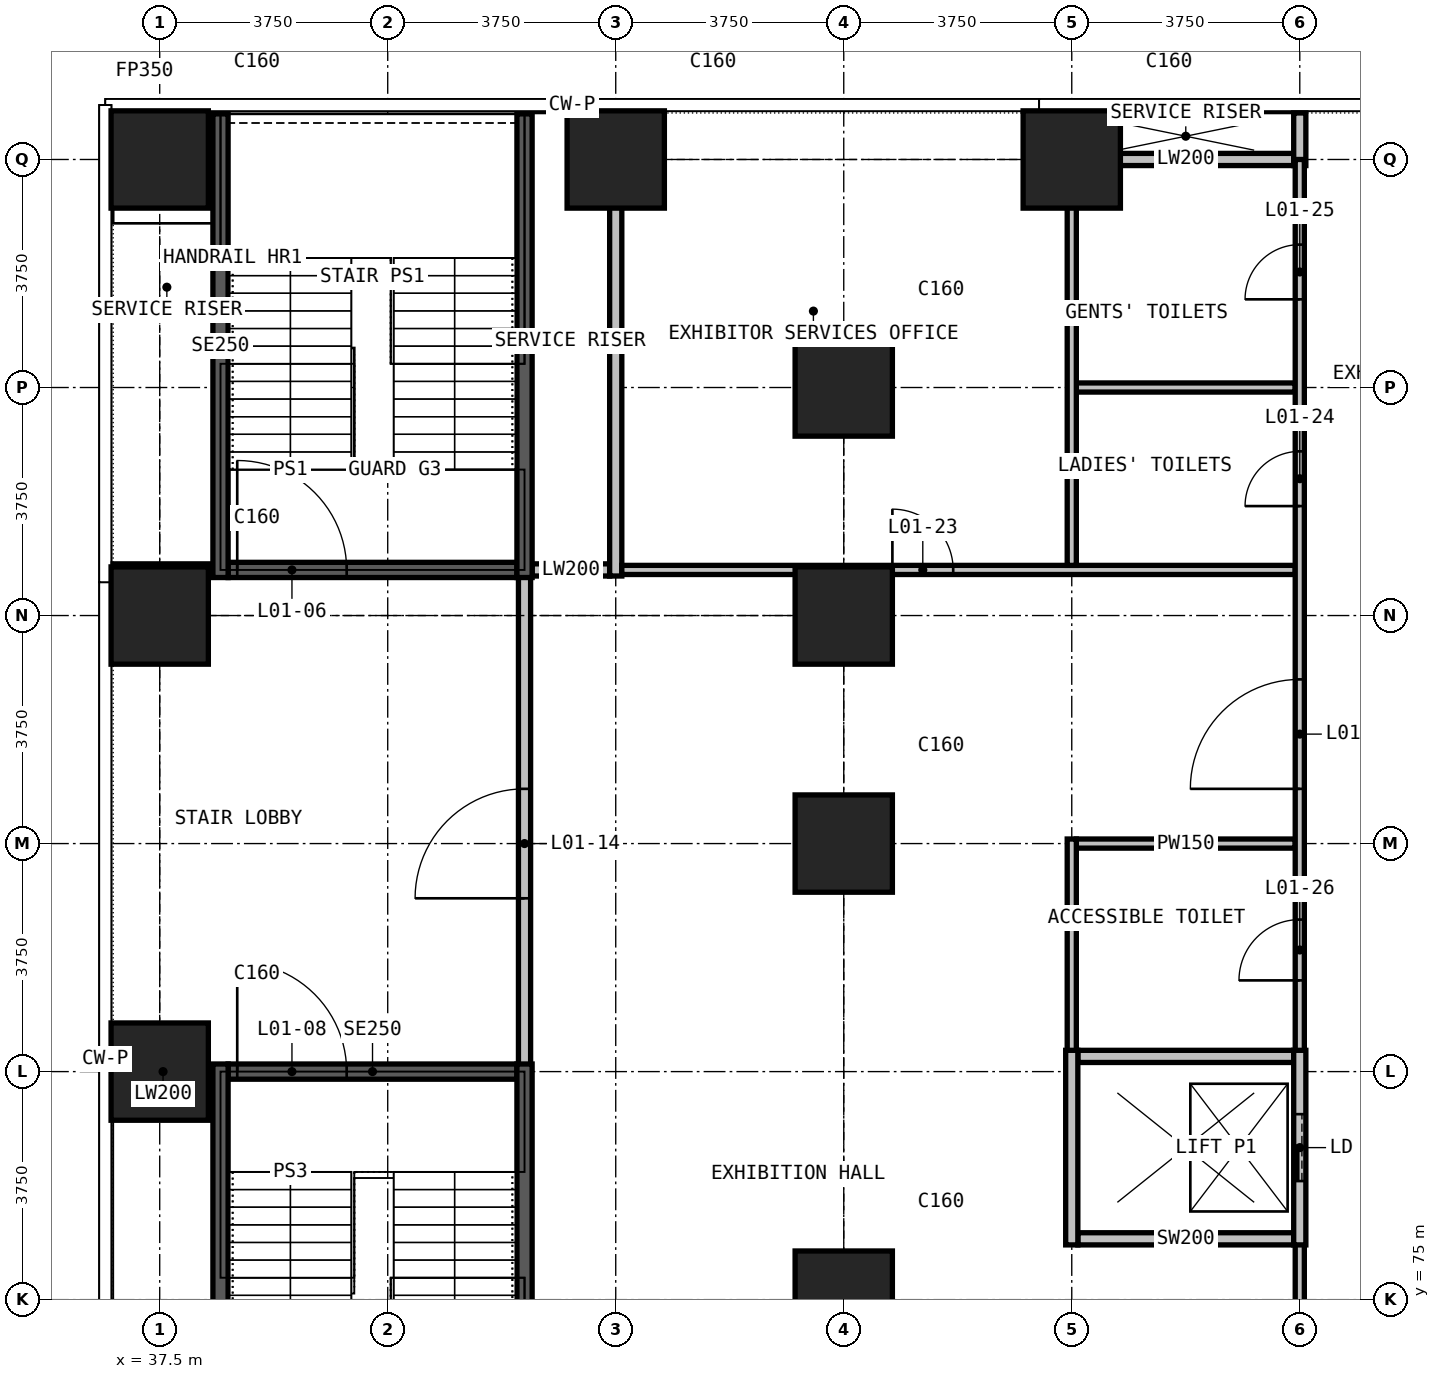
"""IFC4 building model, lengths in metres.
Left out: names, types, materials, properties, quantities, classifications, styles, units other than length and angle.
Written with IfcOpenShell. Run it as: python <this file> out.ifc"""

import sys

from ifc_helpers import new_model, si_unit, direction, frame, frame_2d, origin, origin_2d, place, context, subcontext, project, spatial, rectangle, extrude, element, fill, save


model = new_model("IFC4")
c1 = context("Model", 3, precision=1e-05, world=origin(), true_north=direction((0.0, 1.0)))
c2 = subcontext(c1, "Body", "Model", "MODEL_VIEW")
j1 = project(units=[si_unit("LENGTHUNIT", "METRE"), si_unit("PLANEANGLEUNIT", "RADIAN")], contexts=[c1])
p1 = place(None, origin())
s1 = spatial("IfcSite", under=j1, at=p1, CompositionType="ELEMENT")
p2 = place(p1, origin())
s2 = spatial("IfcBuilding", under=s1, at=p2, CompositionType="ELEMENT")
p3 = place(p2, frame((0.0, 0.0, 7.5)))
s3 = spatial("IfcBuildingStorey", under=s2, at=p3, CompositionType="ELEMENT", Elevation=7.5)
for number, where, z_axis, x_axis in (
    (1, (37.5, 78.75, 0.0), (0.0, 0.0, 1.0), (1.0, 0.0, 0.0)),
    (2, (37.5, 86.25, 0.0), (0.0, 0.0, 1.0), (1.0, 0.0, 0.0)),
    (3, (37.5, 93.75, 0.0), (0.0, 0.0, 1.0), (1.0, 0.0, 0.0)),
    (4, (45.0, 93.75, 0.0), (0.0, 0.0, 1.0), (1.0, 0.0, 0.0)),
    (5, (48.75, 75.0, 0.0), (0.0, 0.0, 1.0), (1.0, 0.0, 0.0)),
    (6, (48.75, 82.5, 0.0), (0.0, 0.0, 1.0), (1.0, 0.0, 0.0)),
    (7, (48.75, 86.25, 0.0), (0.0, 0.0, 1.0), (1.0, 0.0, 0.0)),
    (8, (48.75, 90.0, 0.0), (0.0, 0.0, 1.0), (1.0, 0.0, 0.0)),
    (9, (52.5, 93.75, 0.0), (0.0, 0.0, 1.0), (1.0, 0.0, 0.0)),
):
    element("IfcColumn", number, at=place(p3, frame(where, z_axis=z_axis, x_axis=x_axis)), inside=s3, PredefinedType="COLUMN", context=c2, shape_type="SweptSolid", body=[
        extrude(rectangle(XDim=1.6, YDim=1.6, at=origin_2d()), origin(), (0.0, 0.0, 1.0), 9.0),
    ])
for number, where, z_axis, x_axis in (
    (10, (36.735, 78.75, 0.0), (0.0, 0.0, 1.0), (1.0, 0.0, 0.0)),
    (11, (36.735, 87.0, 0.0), (0.0, 0.0, 1.0), (1.0, 0.0, 0.0)),
):
    element("IfcWall", number, at=place(p3, frame(where, z_axis=z_axis, x_axis=x_axis)), inside=s3, PredefinedType="PARTITIONING", context=c2, shape_type="SweptSolid", body=[
        extrude(rectangle(XDim=1.64, YDim=0.2, at=frame_2d((0.82, 0.0))), origin(), (0.0, 0.0, 1.0), 8.65),
    ])
p4 = place(p3, frame((43.625, 87.0, 0.0), z_axis=(0.0, 0.0, 1.0), x_axis=(1.0, 0.0, 0.0)))
e12 = element("IfcWall", 12, at=p4, inside=s3, PredefinedType="PARTITIONING", context=c2, shape_type="SweptSolid", body=[
    extrude(rectangle(XDim=1.275, YDim=0.2, at=frame_2d((0.637, 0.0))), origin(), (0.0, 0.0, 1.0), 8.65),
])
p5 = place(p3, frame((52.6, 93.75, 0.0), z_axis=(0.0, 0.0, 1.0), x_axis=(1.0, 0.0, 0.0)))
e13 = element("IfcWall", 13, at=p5, inside=s3, PredefinedType="PARTITIONING", context=c2, shape_type="SweptSolid", body=[
    extrude(rectangle(XDim=3.55, YDim=0.2, at=frame_2d((1.775, 0.0))), origin(), (0.0, 0.0, 1.0), 8.65),
])
p6 = place(p3, frame((43.5, 78.625, 0.0), z_axis=(0.0, 0.0, 1.0), x_axis=(0.0, 1.0, 0.0)))
e14 = element("IfcWall", 14, at=p6, inside=s3, PredefinedType="PARTITIONING", context=c2, shape_type="SweptSolid", body=[
    extrude(rectangle(XDim=8.5, YDim=0.2, at=frame_2d((4.25, 0.0))), origin(), (0.0, 0.0, 1.0), 8.65),
])
p7 = place(p6, frame((2.975, 0.0, 0.0)))
e15 = element("IfcOpeningElement", 15, at=p7, cuts=e14, PredefinedType="OPENING", context=c2, shape_type="SweptSolid", body=[
    extrude(rectangle(XDim=1.8, YDim=2.2, at=frame_2d((0.9, 1.1))), frame((0.0, 0.11, 0.0), z_axis=(0.0, -1.0, 0.0), x_axis=(1.0, 0.0, 0.0)), (0.0, 0.0, 1.0), 0.22),
])
p8 = place(p3, frame((45.0, 86.9, 0.0), z_axis=(0.0, 0.0, 1.0), x_axis=(0.0, 1.0, 0.0)))
e16 = element("IfcWall", 16, at=p8, inside=s3, PredefinedType="PARTITIONING", context=c2, shape_type="SweptSolid", body=[
    extrude(rectangle(XDim=7.615, YDim=0.2, at=frame_2d((3.808, 0.0))), origin(), (0.0, 0.0, 1.0), 8.65),
])
for number, where, z_axis, x_axis in (
    (17, (52.5, 93.65, 0.0), (0.0, 0.0, 1.0), (0.0, 1.0, 0.0)),
    (18, (56.25, 93.65, 0.0), (0.0, 0.0, 1.0), (0.0, 1.0, 0.0)),
):
    element("IfcWall", number, at=place(p3, frame(where, z_axis=z_axis, x_axis=x_axis)), inside=s3, PredefinedType="PARTITIONING", context=c2, shape_type="SweptSolid", body=[
        extrude(rectangle(XDim=0.865, YDim=0.2, at=frame_2d((0.433, 0.0))), origin(), (0.0, 0.0, 1.0), 8.65),
    ])
p9 = place(p3, frame((52.575, 82.5, 0.0), z_axis=(0.0, 0.0, 1.0), x_axis=(1.0, 0.0, 0.0)))
e19 = element("IfcWall", 19, at=p9, inside=s3, PredefinedType="PARTITIONING", context=c2, shape_type="SweptSolid", body=[
    extrude(rectangle(XDim=3.6, YDim=0.15, at=frame_2d((1.8, 0.0))), origin(), (0.0, 0.0, 1.0), 8.65),
])
p10 = place(p3, frame((45.1, 87.0, 0.0), z_axis=(0.0, 0.0, 1.0), x_axis=(1.0, 0.0, 0.0)))
e20 = element("IfcWall", 20, at=p10, inside=s3, PredefinedType="PARTITIONING", context=c2, shape_type="SweptSolid", body=[
    extrude(rectangle(XDim=11.075, YDim=0.15, at=frame_2d((5.538, 0.0))), origin(), (0.0, 0.0, 1.0), 8.65),
])
p11 = place(p10, frame((4.45, 0.0, 0.0)))
e21 = element("IfcOpeningElement", 21, at=p11, cuts=e20, PredefinedType="OPENING", context=c2, shape_type="SweptSolid", body=[
    extrude(rectangle(XDim=1.0, YDim=2.2, at=frame_2d((0.5, 1.1))), frame((0.0, 0.085, 0.0), z_axis=(0.0, -1.0, 0.0), x_axis=(1.0, 0.0, 0.0)), (0.0, 0.0, 1.0), 0.17),
])
p12 = place(p3, frame((52.575, 90.0, 0.0), z_axis=(0.0, 0.0, 1.0), x_axis=(1.0, 0.0, 0.0)))
e22 = element("IfcWall", 22, at=p12, inside=s3, PredefinedType="PARTITIONING", context=c2, shape_type="SweptSolid", body=[
    extrude(rectangle(XDim=3.6, YDim=0.15, at=frame_2d((1.8, 0.0))), origin(), (0.0, 0.0, 1.0), 8.65),
])
p13 = place(p3, frame((52.5, 78.9, 0.0), z_axis=(0.0, 0.0, 1.0), x_axis=(0.0, 1.0, 0.0)))
e23 = element("IfcWall", 23, at=p13, inside=s3, PredefinedType="PARTITIONING", context=c2, shape_type="SweptSolid", body=[
    extrude(rectangle(XDim=3.675, YDim=0.15, at=frame_2d((1.837, 0.0))), origin(), (0.0, 0.0, 1.0), 8.65),
])
p14 = place(p3, frame((52.5, 87.075, 0.0), z_axis=(0.0, 0.0, 1.0), x_axis=(0.0, 1.0, 0.0)))
e24 = element("IfcWall", 24, at=p14, inside=s3, PredefinedType="PARTITIONING", context=c2, shape_type="SweptSolid", body=[
    extrude(rectangle(XDim=6.675, YDim=0.15, at=frame_2d((3.337, 0.0))), origin(), (0.0, 0.0, 1.0), 8.65),
])
p15 = place(p3, frame((56.25, 71.25, 0.0), z_axis=(0.0, 0.0, 1.0), x_axis=(0.0, 1.0, 0.0)))
e25 = element("IfcWall", 25, at=p15, inside=s3, PredefinedType="PARTITIONING", context=c2, shape_type="SweptSolid", body=[
    extrude(rectangle(XDim=4.85, YDim=0.15, at=frame_2d((2.425, 0.0))), origin(), (0.0, 0.0, 1.0), 8.65),
])
p16 = place(p15, frame((0.85, 0.0, 0.0)))
e26 = element("IfcOpeningElement", 26, at=p16, cuts=e25, PredefinedType="OPENING", context=c2, shape_type="SweptSolid", body=[
    extrude(rectangle(XDim=1.8, YDim=2.2, at=frame_2d((0.9, 1.1))), frame((0.0, 0.085, 0.0), z_axis=(0.0, -1.0, 0.0), x_axis=(1.0, 0.0, 0.0)), (0.0, 0.0, 1.0), 0.17),
])
p17 = place(p3, frame((56.25, 78.9, 0.0), z_axis=(0.0, 0.0, 1.0), x_axis=(0.0, 1.0, 0.0)))
e27 = element("IfcWall", 27, at=p17, inside=s3, PredefinedType="PARTITIONING", context=c2, shape_type="SweptSolid", body=[
    extrude(rectangle(XDim=14.85, YDim=0.15, at=frame_2d((7.425, 0.0))), origin(), (0.0, 0.0, 1.0), 8.65),
])
p18 = place(p17, frame((4.5, 0.0, 0.0)))
e28 = element("IfcOpeningElement", 28, at=p18, cuts=e27, PredefinedType="OPENING", context=c2, shape_type="SweptSolid", body=[
    extrude(rectangle(XDim=1.8, YDim=2.2, at=frame_2d((0.9, 1.1))), frame((0.0, 0.085, 0.0), z_axis=(0.0, -1.0, 0.0), x_axis=(1.0, 0.0, 0.0)), (0.0, 0.0, 1.0), 0.17),
])
p19 = place(p17, frame((9.15, 0.0, 0.0)))
e29 = element("IfcOpeningElement", 29, at=p19, cuts=e27, PredefinedType="OPENING", context=c2, shape_type="SweptSolid", body=[
    extrude(rectangle(XDim=0.9, YDim=2.2, at=frame_2d((0.45, 1.1))), frame((0.0, 0.085, 0.0), z_axis=(0.0, -1.0, 0.0), x_axis=(1.0, 0.0, 0.0)), (0.0, 0.0, 1.0), 0.17),
])
p20 = place(p17, frame((12.55, 0.0, 0.0)))
e30 = element("IfcOpeningElement", 30, at=p20, cuts=e27, PredefinedType="OPENING", context=c2, shape_type="SweptSolid", body=[
    extrude(rectangle(XDim=0.9, YDim=2.2, at=frame_2d((0.45, 1.1))), frame((0.0, 0.085, 0.0), z_axis=(0.0, -1.0, 0.0), x_axis=(1.0, 0.0, 0.0)), (0.0, 0.0, 1.0), 0.17),
])
p21 = place(p17, frame((1.35, 0.0, 0.0)))
e31 = element("IfcOpeningElement", 31, at=p21, cuts=e27, PredefinedType="OPENING", context=c2, shape_type="SweptSolid", body=[
    extrude(rectangle(XDim=1.0, YDim=2.2, at=frame_2d((0.5, 1.1))), frame((0.0, 0.085, 0.0), z_axis=(0.0, -1.0, 0.0), x_axis=(1.0, 0.0, 0.0)), (0.0, 0.0, 1.0), 0.17),
])
for number, where, z_axis, x_axis in (
    (32, (52.6, 76.0, 0.0), (0.0, 0.0, 1.0), (1.0, 0.0, 0.0)),
    (33, (52.6, 79.0, 0.0), (0.0, 0.0, 1.0), (1.0, 0.0, 0.0)),
):
    element("IfcWall", number, at=place(p3, frame(where, z_axis=z_axis, x_axis=x_axis)), inside=s3, PredefinedType="PARTITIONING", context=c2, shape_type="SweptSolid", body=[
        extrude(rectangle(XDim=3.55, YDim=0.2, at=frame_2d((1.775, 0.0))), origin(), (0.0, 0.0, 1.0), 8.65),
    ])
p22 = place(p3, frame((52.5, 75.9, 0.0), z_axis=(0.0, 0.0, 1.0), x_axis=(0.0, 1.0, 0.0)))
e34 = element("IfcWall", 34, at=p22, inside=s3, PredefinedType="PARTITIONING", context=c2, shape_type="SweptSolid", body=[
    extrude(rectangle(XDim=3.2, YDim=0.2, at=frame_2d((1.6, 0.0))), origin(), (0.0, 0.0, 1.0), 8.65),
])
p23 = place(p3, frame((56.25, 75.9, 0.0), z_axis=(0.0, 0.0, 1.0), x_axis=(0.0, 1.0, 0.0)))
e35 = element("IfcWall", 35, at=p23, inside=s3, PredefinedType="PARTITIONING", context=c2, shape_type="SweptSolid", body=[
    extrude(rectangle(XDim=3.2, YDim=0.2, at=frame_2d((1.6, 0.0))), origin(), (0.0, 0.0, 1.0), 8.65),
])
p24 = place(p23, frame((1.05, 0.0, 0.0)))
e36 = element("IfcOpeningElement", 36, at=p24, cuts=e35, PredefinedType="OPENING", context=c2, shape_type="SweptSolid", body=[
    extrude(rectangle(XDim=1.1, YDim=2.2, at=frame_2d((0.55, 1.1))), frame((0.0, 0.11, 0.0), z_axis=(0.0, -1.0, 0.0), x_axis=(1.0, 0.0, 0.0)), (0.0, 0.0, 1.0), 0.22),
])
p25 = place(p3, frame((38.625, 78.75, 0.0), z_axis=(0.0, 0.0, 1.0), x_axis=(1.0, 0.0, 0.0)))
e37 = element("IfcWall", 37, at=p25, inside=s3, PredefinedType="PARTITIONING", context=c2, shape_type="SweptSolid", body=[
    extrude(rectangle(XDim=4.75, YDim=0.25, at=frame_2d((2.375, 0.0))), origin(), (0.0, 0.0, 1.0), 8.65),
])
p26 = place(p25, frame((0.15, 0.0, 0.0)))
e38 = element("IfcOpeningElement", 38, at=p26, cuts=e37, PredefinedType="OPENING", context=c2, shape_type="SweptSolid", body=[
    extrude(rectangle(XDim=1.8, YDim=2.2, at=frame_2d((0.9, 1.1))), frame((0.0, 0.135, 0.0), z_axis=(0.0, -1.0, 0.0), x_axis=(1.0, 0.0, 0.0)), (0.0, 0.0, 1.0), 0.27),
])
p27 = place(p3, frame((38.625, 87.0, 0.0), z_axis=(0.0, 0.0, 1.0), x_axis=(1.0, 0.0, 0.0)))
e39 = element("IfcWall", 39, at=p27, inside=s3, PredefinedType="PARTITIONING", context=c2, shape_type="SweptSolid", body=[
    extrude(rectangle(XDim=4.75, YDim=0.25, at=frame_2d((2.375, 0.0))), origin(), (0.0, 0.0, 1.0), 8.65),
])
p28 = place(p27, frame((0.15, 0.0, 0.0)))
e40 = element("IfcOpeningElement", 40, at=p28, cuts=e39, PredefinedType="OPENING", context=c2, shape_type="SweptSolid", body=[
    extrude(rectangle(XDim=1.8, YDim=2.2, at=frame_2d((0.9, 1.1))), frame((0.0, 0.135, 0.0), z_axis=(0.0, -1.0, 0.0), x_axis=(1.0, 0.0, 0.0)), (0.0, 0.0, 1.0), 0.27),
])
for number, where, z_axis, x_axis in (
    (41, (38.5, 71.25, 0.0), (0.0, 0.0, 1.0), (0.0, 1.0, 0.0)),
    (42, (38.5, 86.875, 0.0), (0.0, 0.0, 1.0), (0.0, 1.0, 0.0)),
    (43, (43.5, 71.25, 0.0), (0.0, 0.0, 1.0), (0.0, 1.0, 0.0)),
    (44, (43.5, 86.875, 0.0), (0.0, 0.0, 1.0), (0.0, 1.0, 0.0)),
):
    element("IfcWall", number, at=place(p3, frame(where, z_axis=z_axis, x_axis=x_axis)), inside=s3, PredefinedType="PARTITIONING", context=c2, shape_type="SweptSolid", body=[
        extrude(rectangle(XDim=7.625, YDim=0.25, at=frame_2d((3.812, 0.0))), origin(), (0.0, 0.0, 1.0), 8.65),
    ])
p29 = place(p28, origin())
e45 = element("IfcDoor", 45, at=p29, inside=s3, OperationType="DOUBLE_DOOR_SINGLE_SWING", PredefinedType="DOOR", context=c2, shape_type="SweptSolid", body=[
    extrude(rectangle(XDim=1.8, YDim=2.2, at=frame_2d((0.9, 1.1))), frame((0.0, 0.025, 0.0), z_axis=(0.0, -1.0, 0.0), x_axis=(1.0, 0.0, 0.0)), (0.0, 0.0, 1.0), 0.05),
])
fill(e40, e45)
p30 = place(p26, origin())
e46 = element("IfcDoor", 46, at=p30, inside=s3, OperationType="DOUBLE_DOOR_SINGLE_SWING", PredefinedType="DOOR", context=c2, shape_type="SweptSolid", body=[
    extrude(rectangle(XDim=1.8, YDim=2.2, at=frame_2d((0.9, 1.1))), frame((0.0, 0.025, 0.0), z_axis=(0.0, -1.0, 0.0), x_axis=(1.0, 0.0, 0.0)), (0.0, 0.0, 1.0), 0.05),
])
fill(e38, e46)
p31 = place(p24, origin())
e47 = element("IfcDoor", 47, at=p31, inside=s3, OperationType="DOUBLE_DOOR_SLIDING", PredefinedType="DOOR", context=c2, shape_type="SweptSolid", body=[
    extrude(rectangle(XDim=1.1, YDim=2.2, at=frame_2d((0.55, 1.1))), frame((0.0, 0.025, 0.0), z_axis=(0.0, -1.0, 0.0), x_axis=(1.0, 0.0, 0.0)), (0.0, 0.0, 1.0), 0.05),
])
fill(e36, e47)
p32 = place(p18, origin())
e48 = element("IfcDoor", 48, at=p32, inside=s3, OperationType="DOUBLE_DOOR_SINGLE_SWING", PredefinedType="DOOR", context=c2, shape_type="SweptSolid", body=[
    extrude(rectangle(XDim=1.8, YDim=2.2, at=frame_2d((0.9, 1.1))), frame((0.0, 0.025, 0.0), z_axis=(0.0, -1.0, 0.0), x_axis=(1.0, 0.0, 0.0)), (0.0, 0.0, 1.0), 0.05),
])
fill(e28, e48)
p33 = place(p7, origin())
e49 = element("IfcDoor", 49, at=p33, inside=s3, OperationType="DOUBLE_DOOR_SINGLE_SWING", PredefinedType="DOOR", context=c2, shape_type="SweptSolid", body=[
    extrude(rectangle(XDim=1.8, YDim=2.2, at=frame_2d((0.9, 1.1))), frame((0.0, 0.025, 0.0), z_axis=(0.0, -1.0, 0.0), x_axis=(1.0, 0.0, 0.0)), (0.0, 0.0, 1.0), 0.05),
])
fill(e15, e49)
p34 = place(p11, origin())
e50 = element("IfcDoor", 50, at=p34, inside=s3, OperationType="SINGLE_SWING_LEFT", PredefinedType="DOOR", context=c2, shape_type="SweptSolid", body=[
    extrude(rectangle(XDim=1.0, YDim=2.2, at=frame_2d((0.5, 1.1))), frame((0.0, 0.025, 0.0), z_axis=(0.0, -1.0, 0.0), x_axis=(1.0, 0.0, 0.0)), (0.0, 0.0, 1.0), 0.05),
])
fill(e21, e50)
p35 = place(p19, origin())
e51 = element("IfcDoor", 51, at=p35, inside=s3, OperationType="SINGLE_SWING_LEFT", PredefinedType="DOOR", context=c2, shape_type="SweptSolid", body=[
    extrude(rectangle(XDim=0.9, YDim=2.2, at=frame_2d((0.45, 1.1))), frame((0.0, 0.025, 0.0), z_axis=(0.0, -1.0, 0.0), x_axis=(1.0, 0.0, 0.0)), (0.0, 0.0, 1.0), 0.05),
])
fill(e29, e51)
p36 = place(p20, origin())
e52 = element("IfcDoor", 52, at=p36, inside=s3, OperationType="SINGLE_SWING_RIGHT", PredefinedType="DOOR", context=c2, shape_type="SweptSolid", body=[
    extrude(rectangle(XDim=0.9, YDim=2.2, at=frame_2d((0.45, 1.1))), frame((0.0, 0.025, 0.0), z_axis=(0.0, -1.0, 0.0), x_axis=(1.0, 0.0, 0.0)), (0.0, 0.0, 1.0), 0.05),
])
fill(e30, e52)
p37 = place(p21, origin())
e53 = element("IfcDoor", 53, at=p37, inside=s3, OperationType="SINGLE_SWING_LEFT", PredefinedType="DOOR", context=c2, shape_type="SweptSolid", body=[
    extrude(rectangle(XDim=1.0, YDim=2.2, at=frame_2d((0.5, 1.1))), frame((0.0, 0.025, 0.0), z_axis=(0.0, -1.0, 0.0), x_axis=(1.0, 0.0, 0.0)), (0.0, 0.0, 1.0), 0.05),
])
fill(e31, e53)
save(model, sys.argv[1])
